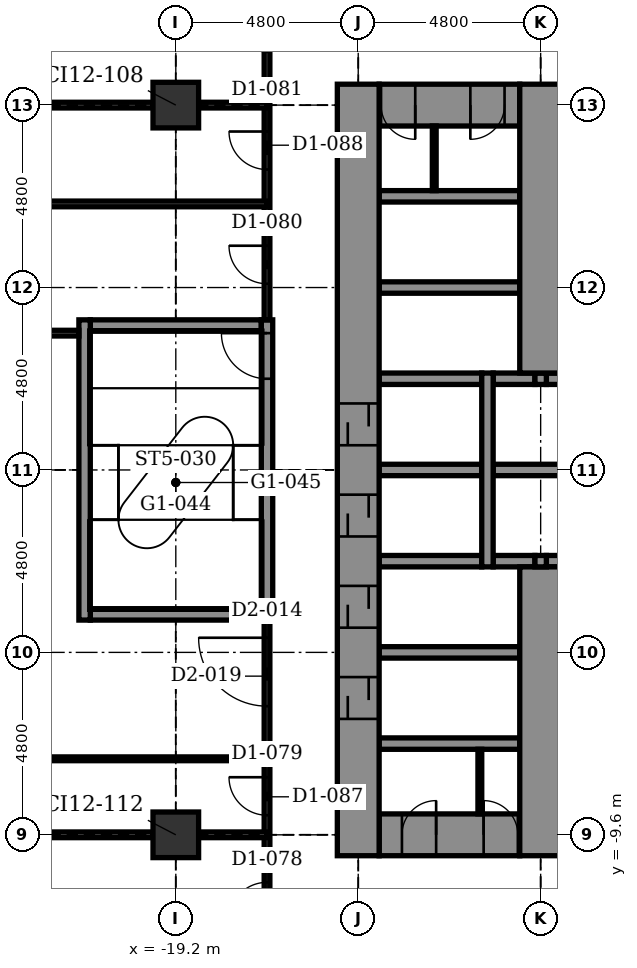
"""IFC4 building model, lengths in metres.
Left out: names, types, materials, properties, quantities, classifications, styles, units other than length and angle.
Written with IfcOpenShell. Run it as: python <this file> out.ifc"""

import sys

from ifc_helpers import new_model, si_unit, direction, frame, frame_2d, origin, origin_2d, place, context, subcontext, project, spatial, rectangle, extrude, element, fill, save


model = new_model("IFC4")
c1 = context("Model", 3, precision=1e-05, world=origin(), true_north=direction((0.0, 1.0)))
c2 = subcontext(c1, "Body", "Model", "MODEL_VIEW")
j1 = project(units=[si_unit("LENGTHUNIT", "METRE"), si_unit("PLANEANGLEUNIT", "RADIAN")], contexts=[c1])
p1 = place(None, origin())
s1 = spatial("IfcSite", under=j1, at=p1, CompositionType="ELEMENT")
p2 = place(p1, origin())
s2 = spatial("IfcBuilding", under=s1, at=p2, CompositionType="ELEMENT")
p3 = place(p2, frame((0.0, 0.0, 22.4)))
s3 = spatial("IfcBuildingStorey", under=s2, at=p3, CompositionType="ELEMENT", Elevation=22.4)
for number, where, z_axis, x_axis in (
    (1, (-19.2, -9.6, -0.25), (0.0, 0.0, 1.0), (1.0, 0.0, 0.0)),
    (2, (-19.2, 9.6, -0.25), (0.0, 0.0, 1.0), (1.0, 0.0, 0.0)),
):
    element("IfcColumn", number, at=place(p3, frame(where, z_axis=z_axis, x_axis=x_axis)), inside=s3, PredefinedType="COLUMN", context=c2, shape_type="SweptSolid", body=[
        extrude(rectangle(XDim=1.2, YDim=1.2, at=origin_2d()), origin(), (0.0, 0.0, 1.0), 5.5),
    ])
p4 = place(p3, frame((-13.85, -9.6, -0.25), z_axis=(0.0, 0.0, 1.0), x_axis=(1.0, 0.0, 0.0)))
e3 = element("IfcWall", 3, at=p4, inside=s3, PredefinedType="SHEAR", context=c2, shape_type="SweptSolid", body=[
    extrude(rectangle(XDim=3.7, YDim=1.1, at=frame_2d((1.85, 0.0))), origin(), (0.0, 0.0, 1.0), 5.5),
])
p5 = place(p4, frame((0.6, 0.0, 0.25)))
e4 = element("IfcOpeningElement", 4, at=p5, cuts=e3, PredefinedType="OPENING", context=c2, shape_type="SweptSolid", body=[
    extrude(rectangle(XDim=0.9, YDim=2.1, at=frame_2d((0.45, 1.05))), frame((0.0, 0.56, 0.0), z_axis=(0.0, -1.0, 0.0), x_axis=(1.0, 0.0, 0.0)), (0.0, 0.0, 1.0), 1.12),
])
p6 = place(p4, frame((2.75, 0.0, 0.25)))
e5 = element("IfcOpeningElement", 5, at=p6, cuts=e3, PredefinedType="OPENING", context=c2, shape_type="SweptSolid", body=[
    extrude(rectangle(XDim=0.9, YDim=2.1, at=frame_2d((0.45, 1.05))), frame((0.0, 0.56, 0.0), z_axis=(0.0, -1.0, 0.0), x_axis=(1.0, 0.0, 0.0)), (0.0, 0.0, 1.0), 1.12),
])
for number, where, z_axis, x_axis in (
    (6, (-13.85, -7.2, -0.25), (0.0, 0.0, 1.0), (1.0, 0.0, 0.0)),
    (7, (-13.85, -4.8, -0.25), (0.0, 0.0, 1.0), (1.0, 0.0, 0.0)),
):
    element("IfcWall", number, at=place(p3, frame(where, z_axis=z_axis, x_axis=x_axis)), inside=s3, PredefinedType="STANDARD", context=c2, shape_type="SweptSolid", body=[
        extrude(rectangle(XDim=3.7, YDim=0.3, at=frame_2d((1.85, 0.0))), origin(), (0.0, 0.0, 1.0), 5.5),
    ])
p7 = place(p3, frame((-21.45, -3.8, -0.25), z_axis=(0.0, 0.0, 1.0), x_axis=(1.0, 0.0, 0.0)))
e8 = element("IfcWall", 8, at=p7, inside=s3, PredefinedType="STANDARD", context=c2, shape_type="SweptSolid", body=[
    extrude(rectangle(XDim=4.5, YDim=0.3, at=frame_2d((2.25, 0.0))), origin(), (0.0, 0.0, 1.0), 5.5),
])
p8 = place(p3, frame((-13.85, -2.4, -0.25), z_axis=(0.0, 0.0, 1.0), x_axis=(1.0, 0.0, 0.0)))
e9 = element("IfcWall", 9, at=p8, inside=s3, PredefinedType="STANDARD", context=c2, shape_type="SweptSolid", body=[
    extrude(rectangle(XDim=2.7, YDim=0.3, at=frame_2d((1.35, 0.0))), origin(), (0.0, 0.0, 1.0), 5.5),
])
p9 = place(p3, frame((-10.85, -2.4, -0.25), z_axis=(0.0, 0.0, 1.0), x_axis=(1.0, 0.0, 0.0)))
e10 = element("IfcWall", 10, at=p9, inside=s3, PredefinedType="STANDARD", context=c2, shape_type="SweptSolid", body=[
    extrude(rectangle(XDim=1.1, YDim=0.3, at=frame_2d((0.55, 0.0))), origin(), (0.0, 0.0, 1.0), 5.5),
])
p10 = place(p3, frame((-9.45, -2.4, -0.25), z_axis=(0.0, 0.0, 1.0), x_axis=(1.0, 0.0, 0.0)))
e11 = element("IfcWall", 11, at=p10, inside=s3, PredefinedType="STANDARD", context=c2, shape_type="SweptSolid", body=[
    extrude(rectangle(XDim=1.9, YDim=0.3, at=frame_2d((0.95, 0.0))), origin(), (0.0, 0.0, 1.0), 5.5),
])
p11 = place(p3, frame((-13.85, 0.0, -0.25), z_axis=(0.0, 0.0, 1.0), x_axis=(1.0, 0.0, 0.0)))
e12 = element("IfcWall", 12, at=p11, inside=s3, PredefinedType="STANDARD", context=c2, shape_type="SweptSolid", body=[
    extrude(rectangle(XDim=2.7, YDim=0.3, at=frame_2d((1.35, 0.0))), origin(), (0.0, 0.0, 1.0), 5.5),
])
p12 = place(p3, frame((-10.85, 0.0, -0.25), z_axis=(0.0, 0.0, 1.0), x_axis=(1.0, 0.0, 0.0)))
e13 = element("IfcWall", 13, at=p12, inside=s3, PredefinedType="STANDARD", context=c2, shape_type="SweptSolid", body=[
    extrude(rectangle(XDim=3.3, YDim=0.3, at=frame_2d((1.65, 0.0))), origin(), (0.0, 0.0, 1.0), 5.5),
])
p13 = place(p3, frame((-13.85, 2.4, -0.25), z_axis=(0.0, 0.0, 1.0), x_axis=(1.0, 0.0, 0.0)))
e14 = element("IfcWall", 14, at=p13, inside=s3, PredefinedType="STANDARD", context=c2, shape_type="SweptSolid", body=[
    extrude(rectangle(XDim=2.7, YDim=0.3, at=frame_2d((1.35, 0.0))), origin(), (0.0, 0.0, 1.0), 5.5),
])
p14 = place(p3, frame((-10.85, 2.4, -0.25), z_axis=(0.0, 0.0, 1.0), x_axis=(1.0, 0.0, 0.0)))
e15 = element("IfcWall", 15, at=p14, inside=s3, PredefinedType="STANDARD", context=c2, shape_type="SweptSolid", body=[
    extrude(rectangle(XDim=1.1, YDim=0.3, at=frame_2d((0.55, 0.0))), origin(), (0.0, 0.0, 1.0), 5.5),
])
p15 = place(p3, frame((-9.45, 2.4, -0.25), z_axis=(0.0, 0.0, 1.0), x_axis=(1.0, 0.0, 0.0)))
e16 = element("IfcWall", 16, at=p15, inside=s3, PredefinedType="STANDARD", context=c2, shape_type="SweptSolid", body=[
    extrude(rectangle(XDim=1.9, YDim=0.3, at=frame_2d((0.95, 0.0))), origin(), (0.0, 0.0, 1.0), 5.5),
])
p16 = place(p3, frame((-21.45, 3.8, -0.25), z_axis=(0.0, 0.0, 1.0), x_axis=(1.0, 0.0, 0.0)))
e17 = element("IfcWall", 17, at=p16, inside=s3, PredefinedType="STANDARD", context=c2, shape_type="SweptSolid", body=[
    extrude(rectangle(XDim=4.5, YDim=0.3, at=frame_2d((2.25, 0.0))), origin(), (0.0, 0.0, 1.0), 5.5),
])
for number, where, z_axis, x_axis in (
    (18, (-13.85, 4.8, -0.25), (0.0, 0.0, 1.0), (1.0, 0.0, 0.0)),
    (19, (-13.85, 7.2, -0.25), (0.0, 0.0, 1.0), (1.0, 0.0, 0.0)),
):
    element("IfcWall", number, at=place(p3, frame(where, z_axis=z_axis, x_axis=x_axis)), inside=s3, PredefinedType="STANDARD", context=c2, shape_type="SweptSolid", body=[
        extrude(rectangle(XDim=3.7, YDim=0.3, at=frame_2d((1.85, 0.0))), origin(), (0.0, 0.0, 1.0), 5.5),
    ])
p17 = place(p3, frame((-13.85, 9.6, -0.25), z_axis=(0.0, 0.0, 1.0), x_axis=(1.0, 0.0, 0.0)))
e20 = element("IfcWall", 20, at=p17, inside=s3, PredefinedType="SHEAR", context=c2, shape_type="SweptSolid", body=[
    extrude(rectangle(XDim=3.7, YDim=1.1, at=frame_2d((1.85, 0.0))), origin(), (0.0, 0.0, 1.0), 5.5),
])
p18 = place(p17, frame((0.05, 0.0, 0.25)))
e21 = element("IfcOpeningElement", 21, at=p18, cuts=e20, PredefinedType="OPENING", context=c2, shape_type="SweptSolid", body=[
    extrude(rectangle(XDim=0.9, YDim=2.1, at=frame_2d((0.45, 1.05))), frame((0.0, 0.56, 0.0), z_axis=(0.0, -1.0, 0.0), x_axis=(1.0, 0.0, 0.0)), (0.0, 0.0, 1.0), 1.12),
])
p19 = place(p17, frame((2.4, 0.0, 0.25)))
e22 = element("IfcOpeningElement", 22, at=p19, cuts=e20, PredefinedType="OPENING", context=c2, shape_type="SweptSolid", body=[
    extrude(rectangle(XDim=0.9, YDim=2.1, at=frame_2d((0.45, 1.05))), frame((0.0, 0.56, 0.0), z_axis=(0.0, -1.0, 0.0), x_axis=(1.0, 0.0, 0.0)), (0.0, 0.0, 1.0), 1.12),
])
p20 = place(p3, frame((-21.6, -3.95, -0.25), z_axis=(0.0, 0.0, 1.0), x_axis=(0.0, 1.0, 0.0)))
e23 = element("IfcWall", 23, at=p20, inside=s3, PredefinedType="STANDARD", context=c2, shape_type="SweptSolid", body=[
    extrude(rectangle(XDim=7.9, YDim=0.3, at=frame_2d((3.95, 0.0))), origin(), (0.0, 0.0, 1.0), 5.5),
])
p21 = place(p3, frame((-16.8, -3.95, -0.25), z_axis=(0.0, 0.0, 1.0), x_axis=(0.0, 1.0, 0.0)))
e24 = element("IfcWall", 24, at=p21, inside=s3, PredefinedType="STANDARD", context=c2, shape_type="SweptSolid", body=[
    extrude(rectangle(XDim=7.9, YDim=0.3, at=frame_2d((3.95, 0.0))), origin(), (0.0, 0.0, 1.0), 5.5),
])
p22 = place(p21, frame((6.35, 0.0, 0.25)))
e25 = element("IfcOpeningElement", 25, at=p22, cuts=e24, PredefinedType="OPENING", context=c2, shape_type="SweptSolid", body=[
    extrude(rectangle(XDim=1.2, YDim=2.1, at=frame_2d((0.6, 1.05))), frame((0.0, 0.16, 0.0), z_axis=(0.0, -1.0, 0.0), x_axis=(1.0, 0.0, 0.0)), (0.0, 0.0, 1.0), 0.32),
])
p23 = place(p3, frame((-14.4, -10.15, -0.25), z_axis=(0.0, 0.0, 1.0), x_axis=(0.0, 1.0, 0.0)))
e26 = element("IfcWall", 26, at=p23, inside=s3, PredefinedType="SHEAR", context=c2, shape_type="SweptSolid", body=[
    extrude(rectangle(XDim=20.3, YDim=1.1, at=frame_2d((10.15, 0.0))), origin(), (0.0, 0.0, 1.0), 5.5),
])
p24 = place(p23, frame((3.6, 0.0, 0.25)))
e27 = element("IfcOpeningElement", 27, at=p24, cuts=e26, PredefinedType="OPENING", context=c2, shape_type="SweptSolid", body=[
    extrude(rectangle(XDim=1.1, YDim=2.1, at=frame_2d((0.55, 1.05))), frame((0.0, 0.56, 0.0), z_axis=(0.0, -1.0, 0.0), x_axis=(1.0, 0.0, 0.0)), (0.0, 0.0, 1.0), 1.12),
])
p25 = place(p23, frame((6.0, 0.0, 0.25)))
e28 = element("IfcOpeningElement", 28, at=p25, cuts=e26, PredefinedType="OPENING", context=c2, shape_type="SweptSolid", body=[
    extrude(rectangle(XDim=1.1, YDim=2.1, at=frame_2d((0.55, 1.05))), frame((0.0, 0.56, 0.0), z_axis=(0.0, -1.0, 0.0), x_axis=(1.0, 0.0, 0.0)), (0.0, 0.0, 1.0), 1.12),
])
p26 = place(p23, frame((8.4, 0.0, 0.25)))
e29 = element("IfcOpeningElement", 29, at=p26, cuts=e26, PredefinedType="OPENING", context=c2, shape_type="SweptSolid", body=[
    extrude(rectangle(XDim=1.1, YDim=2.1, at=frame_2d((0.55, 1.05))), frame((0.0, 0.56, 0.0), z_axis=(0.0, -1.0, 0.0), x_axis=(1.0, 0.0, 0.0)), (0.0, 0.0, 1.0), 1.12),
])
p27 = place(p23, frame((10.8, 0.0, 0.25)))
e30 = element("IfcOpeningElement", 30, at=p27, cuts=e26, PredefinedType="OPENING", context=c2, shape_type="SweptSolid", body=[
    extrude(rectangle(XDim=1.1, YDim=2.1, at=frame_2d((0.55, 1.05))), frame((0.0, 0.56, 0.0), z_axis=(0.0, -1.0, 0.0), x_axis=(1.0, 0.0, 0.0)), (0.0, 0.0, 1.0), 1.12),
])
p28 = place(p3, frame((-11.0, -2.55, -0.25), z_axis=(0.0, 0.0, 1.0), x_axis=(0.0, 1.0, 0.0)))
e31 = element("IfcWall", 31, at=p28, inside=s3, PredefinedType="STANDARD", context=c2, shape_type="SweptSolid", body=[
    extrude(rectangle(XDim=5.1, YDim=0.3, at=frame_2d((2.55, 0.0))), origin(), (0.0, 0.0, 1.0), 5.5),
])
p29 = place(p3, frame((-9.6, -10.15, -0.25), z_axis=(0.0, 0.0, 1.0), x_axis=(0.0, 1.0, 0.0)))
e32 = element("IfcWall", 32, at=p29, inside=s3, PredefinedType="SHEAR", context=c2, shape_type="SweptSolid", body=[
    extrude(rectangle(XDim=7.6, YDim=1.1, at=frame_2d((3.8, 0.0))), origin(), (0.0, 0.0, 1.0), 5.5),
])
for number, where, z_axis, x_axis in (
    (33, (-9.6, -2.55, -0.25), (0.0, 0.0, 1.0), (0.0, 1.0, 0.0)),
    (34, (-9.6, 2.25, -0.25), (0.0, 0.0, 1.0), (0.0, 1.0, 0.0)),
):
    element("IfcWall", number, at=place(p3, frame(where, z_axis=z_axis, x_axis=x_axis)), inside=s3, PredefinedType="STANDARD", context=c2, shape_type="SweptSolid", body=[
        extrude(rectangle(XDim=0.3, YDim=0.3, at=frame_2d((0.15, 0.0))), origin(), (0.0, 0.0, 1.0), 5.5),
    ])
p30 = place(p3, frame((-9.6, 2.55, -0.25), z_axis=(0.0, 0.0, 1.0), x_axis=(0.0, 1.0, 0.0)))
e35 = element("IfcWall", 35, at=p30, inside=s3, PredefinedType="SHEAR", context=c2, shape_type="SweptSolid", body=[
    extrude(rectangle(XDim=7.6, YDim=1.1, at=frame_2d((3.8, 0.0))), origin(), (0.0, 0.0, 1.0), 5.5),
])
for number, where, z_axis, x_axis in (
    (36, (-11.2, -9.05, 0.0), (0.0, 0.0, 1.0), (0.0, 1.0, 0.0)),
    (37, (-12.4, 7.35, 0.0), (0.0, 0.0, 1.0), (0.0, 1.0, 0.0)),
):
    element("IfcWall", number, at=place(p3, frame(where, z_axis=z_axis, x_axis=x_axis)), inside=s3, PredefinedType="PARTITIONING", context=c2, shape_type="SweptSolid", body=[
        extrude(rectangle(XDim=1.7, YDim=0.1, at=frame_2d((0.85, 0.0))), origin(), (0.0, 0.0, 1.0), 5.25),
    ])
p31 = place(p3, frame((-16.8, -12.7, 0.0), z_axis=(0.0, 0.0, 1.0), x_axis=(0.0, 1.0, 0.0)))
e38 = element("IfcWall", 38, at=p31, inside=s3, PredefinedType="PARTITIONING", context=c2, shape_type="SweptSolid", body=[
    extrude(rectangle(XDim=8.75, YDim=0.15, at=frame_2d((4.375, 0.0))), origin(), (0.0, 0.0, 1.0), 5.25),
])
p32 = place(p31, frame((0.85, 0.0, 0.0)))
e39 = element("IfcOpeningElement", 39, at=p32, cuts=e38, PredefinedType="OPENING", context=c2, shape_type="SweptSolid", body=[
    extrude(rectangle(XDim=1.0, YDim=2.1, at=frame_2d((0.5, 1.05))), frame((0.0, 0.085, 0.0), z_axis=(0.0, -1.0, 0.0), x_axis=(1.0, 0.0, 0.0)), (0.0, 0.0, 1.0), 0.17),
])
p33 = place(p31, frame((3.615, 0.0, 0.0)))
e40 = element("IfcOpeningElement", 40, at=p33, cuts=e38, PredefinedType="OPENING", context=c2, shape_type="SweptSolid", body=[
    extrude(rectangle(XDim=1.0, YDim=2.1, at=frame_2d((0.5, 1.05))), frame((0.0, 0.085, 0.0), z_axis=(0.0, -1.0, 0.0), x_axis=(1.0, 0.0, 0.0)), (0.0, 0.0, 1.0), 0.17),
])
p34 = place(p31, frame((6.485, 0.0, 0.0)))
e41 = element("IfcOpeningElement", 41, at=p34, cuts=e38, PredefinedType="OPENING", context=c2, shape_type="SweptSolid", body=[
    extrude(rectangle(XDim=1.8, YDim=2.1, at=frame_2d((0.9, 1.05))), frame((0.0, 0.085, 0.0), z_axis=(0.0, -1.0, 0.0), x_axis=(1.0, 0.0, 0.0)), (0.0, 0.0, 1.0), 0.17),
])
p35 = place(p3, frame((-16.8, 3.95, 0.0), z_axis=(0.0, 0.0, 1.0), x_axis=(0.0, 1.0, 0.0)))
e42 = element("IfcWall", 42, at=p35, inside=s3, PredefinedType="PARTITIONING", context=c2, shape_type="SweptSolid", body=[
    extrude(rectangle(XDim=9.05, YDim=0.15, at=frame_2d((4.525, 0.0))), origin(), (0.0, 0.0, 1.0), 5.25),
])
p36 = place(p35, frame((0.95, 0.0, 0.0)))
e43 = element("IfcOpeningElement", 43, at=p36, cuts=e42, PredefinedType="OPENING", context=c2, shape_type="SweptSolid", body=[
    extrude(rectangle(XDim=1.0, YDim=2.1, at=frame_2d((0.5, 1.05))), frame((0.0, 0.085, 0.0), z_axis=(0.0, -1.0, 0.0), x_axis=(1.0, 0.0, 0.0)), (0.0, 0.0, 1.0), 0.17),
])
p37 = place(p35, frame((3.955, 0.0, 0.0)))
e44 = element("IfcOpeningElement", 44, at=p37, cuts=e42, PredefinedType="OPENING", context=c2, shape_type="SweptSolid", body=[
    extrude(rectangle(XDim=1.0, YDim=2.1, at=frame_2d((0.5, 1.05))), frame((0.0, 0.085, 0.0), z_axis=(0.0, -1.0, 0.0), x_axis=(1.0, 0.0, 0.0)), (0.0, 0.0, 1.0), 0.17),
])
p38 = place(p35, frame((7.05, 0.0, 0.0)))
e45 = element("IfcOpeningElement", 45, at=p38, cuts=e42, PredefinedType="OPENING", context=c2, shape_type="SweptSolid", body=[
    extrude(rectangle(XDim=1.0, YDim=2.1, at=frame_2d((0.5, 1.05))), frame((0.0, 0.085, 0.0), z_axis=(0.0, -1.0, 0.0), x_axis=(1.0, 0.0, 0.0)), (0.0, 0.0, 1.0), 0.17),
])
p39 = place(p3, frame((-30.987, -9.6, 0.0), z_axis=(0.0, 0.0, 1.0), x_axis=(1.0, 0.0, 0.0)))
e46 = element("IfcWall", 46, at=p39, inside=s3, PredefinedType="PARTITIONING", context=c2, shape_type="SweptSolid", body=[
    extrude(rectangle(XDim=11.187, YDim=0.15, at=frame_2d((5.593, 0.0))), origin(), (0.0, 0.0, 1.0), 4.488),
])
p40 = place(p3, frame((-18.6, -9.6, 0.0), z_axis=(0.0, 0.0, 1.0), x_axis=(1.0, 0.0, 0.0)))
e47 = element("IfcWall", 47, at=p40, inside=s3, PredefinedType="PARTITIONING", context=c2, shape_type="SweptSolid", body=[
    extrude(rectangle(XDim=1.8, YDim=0.15, at=frame_2d((0.9, 0.0))), origin(), (0.0, 0.0, 1.0), 4.642),
])
p41 = place(p3, frame((-32.142, -7.6, 0.0), z_axis=(0.0, 0.0, 1.0), x_axis=(1.0, 0.0, 0.0)))
e48 = element("IfcWall", 48, at=p41, inside=s3, PredefinedType="PARTITIONING", context=c2, shape_type="SweptSolid", body=[
    extrude(rectangle(XDim=15.342, YDim=0.1, at=frame_2d((7.671, 0.0))), origin(), (0.0, 0.0, 1.0), 5.25),
])
p42 = place(p3, frame((-34.451, 3.6, 0.0), z_axis=(0.0, 0.0, 1.0), x_axis=(1.0, 0.0, 0.0)))
e49 = element("IfcWall", 49, at=p42, inside=s3, PredefinedType="PARTITIONING", context=c2, shape_type="SweptSolid", body=[
    extrude(rectangle(XDim=12.701, YDim=0.15, at=frame_2d((6.351, 0.0))), origin(), (0.0, 0.0, 1.0), 5.25),
])
p43 = place(p3, frame((-32.488, 7.0, 0.0), z_axis=(0.0, 0.0, 1.0), x_axis=(1.0, 0.0, 0.0)))
e50 = element("IfcWall", 50, at=p43, inside=s3, PredefinedType="PARTITIONING", context=c2, shape_type="SweptSolid", body=[
    extrude(rectangle(XDim=15.688, YDim=0.15, at=frame_2d((7.844, 0.0))), origin(), (0.0, 0.0, 1.0), 5.25),
])
p44 = place(p3, frame((-30.987, 9.6, 0.0), z_axis=(0.0, 0.0, 1.0), x_axis=(1.0, 0.0, 0.0)))
e51 = element("IfcWall", 51, at=p44, inside=s3, PredefinedType="PARTITIONING", context=c2, shape_type="SweptSolid", body=[
    extrude(rectangle(XDim=11.187, YDim=0.15, at=frame_2d((5.593, 0.0))), origin(), (0.0, 0.0, 1.0), 4.488),
])
p45 = place(p3, frame((-18.6, 9.6, 0.0), z_axis=(0.0, 0.0, 1.0), x_axis=(1.0, 0.0, 0.0)))
e52 = element("IfcWall", 52, at=p45, inside=s3, PredefinedType="PARTITIONING", context=c2, shape_type="SweptSolid", body=[
    extrude(rectangle(XDim=1.8, YDim=0.15, at=frame_2d((0.9, 0.0))), origin(), (0.0, 0.0, 1.0), 4.642),
])
p46 = place(p32, origin())
e53 = element("IfcDoor", 53, at=p46, inside=s3, OperationType="SINGLE_SWING_LEFT", PredefinedType="DOOR", context=c2, shape_type="SweptSolid", body=[
    extrude(rectangle(XDim=1.0, YDim=2.1, at=frame_2d((0.5, 1.05))), frame((0.0, 0.025, 0.0), z_axis=(0.0, -1.0, 0.0), x_axis=(1.0, 0.0, 0.0)), (0.0, 0.0, 1.0), 0.05),
])
fill(e39, e53)
p47 = place(p33, origin())
e54 = element("IfcDoor", 54, at=p47, inside=s3, OperationType="SINGLE_SWING_RIGHT", PredefinedType="DOOR", context=c2, shape_type="SweptSolid", body=[
    extrude(rectangle(XDim=1.0, YDim=2.1, at=frame_2d((0.5, 1.05))), frame((0.0, 0.025, 0.0), z_axis=(0.0, -1.0, 0.0), x_axis=(1.0, 0.0, 0.0)), (0.0, 0.0, 1.0), 0.05),
])
fill(e40, e54)
p48 = place(p34, origin())
e55 = element("IfcDoor", 55, at=p48, inside=s3, OperationType="SINGLE_SWING_RIGHT", PredefinedType="DOOR", context=c2, shape_type="SweptSolid", body=[
    extrude(rectangle(XDim=1.8, YDim=2.1, at=frame_2d((0.9, 1.05))), frame((0.0, 0.025, 0.0), z_axis=(0.0, -1.0, 0.0), x_axis=(1.0, 0.0, 0.0)), (0.0, 0.0, 1.0), 0.05),
])
fill(e41, e55)
p49 = place(p36, origin())
e56 = element("IfcDoor", 56, at=p49, inside=s3, OperationType="SINGLE_SWING_RIGHT", PredefinedType="DOOR", context=c2, shape_type="SweptSolid", body=[
    extrude(rectangle(XDim=1.0, YDim=2.1, at=frame_2d((0.5, 1.05))), frame((0.0, 0.025, 0.0), z_axis=(0.0, -1.0, 0.0), x_axis=(1.0, 0.0, 0.0)), (0.0, 0.0, 1.0), 0.05),
])
fill(e43, e56)
p50 = place(p37, origin())
e57 = element("IfcDoor", 57, at=p50, inside=s3, OperationType="SINGLE_SWING_RIGHT", PredefinedType="DOOR", context=c2, shape_type="SweptSolid", body=[
    extrude(rectangle(XDim=1.0, YDim=2.1, at=frame_2d((0.5, 1.05))), frame((0.0, 0.025, 0.0), z_axis=(0.0, -1.0, 0.0), x_axis=(1.0, 0.0, 0.0)), (0.0, 0.0, 1.0), 0.05),
])
fill(e44, e57)
p51 = place(p24, origin())
e58 = element("IfcDoor", 58, at=p51, inside=s3, OperationType="DOUBLE_DOOR_SLIDING", PredefinedType="DOOR", context=c2, shape_type="SweptSolid", body=[
    extrude(rectangle(XDim=1.1, YDim=2.1, at=frame_2d((0.55, 1.05))), frame((0.0, 0.025, 0.0), z_axis=(0.0, -1.0, 0.0), x_axis=(1.0, 0.0, 0.0)), (0.0, 0.0, 1.0), 0.05),
])
fill(e27, e58)
p52 = place(p25, origin())
e59 = element("IfcDoor", 59, at=p52, inside=s3, OperationType="DOUBLE_DOOR_SLIDING", PredefinedType="DOOR", context=c2, shape_type="SweptSolid", body=[
    extrude(rectangle(XDim=1.1, YDim=2.1, at=frame_2d((0.55, 1.05))), frame((0.0, 0.025, 0.0), z_axis=(0.0, -1.0, 0.0), x_axis=(1.0, 0.0, 0.0)), (0.0, 0.0, 1.0), 0.05),
])
fill(e28, e59)
p53 = place(p26, origin())
e60 = element("IfcDoor", 60, at=p53, inside=s3, OperationType="DOUBLE_DOOR_SLIDING", PredefinedType="DOOR", context=c2, shape_type="SweptSolid", body=[
    extrude(rectangle(XDim=1.1, YDim=2.1, at=frame_2d((0.55, 1.05))), frame((0.0, 0.025, 0.0), z_axis=(0.0, -1.0, 0.0), x_axis=(1.0, 0.0, 0.0)), (0.0, 0.0, 1.0), 0.05),
])
fill(e29, e60)
p54 = place(p27, origin())
e61 = element("IfcDoor", 61, at=p54, inside=s3, OperationType="DOUBLE_DOOR_SLIDING", PredefinedType="DOOR", context=c2, shape_type="SweptSolid", body=[
    extrude(rectangle(XDim=1.1, YDim=2.1, at=frame_2d((0.55, 1.05))), frame((0.0, 0.025, 0.0), z_axis=(0.0, -1.0, 0.0), x_axis=(1.0, 0.0, 0.0)), (0.0, 0.0, 1.0), 0.05),
])
fill(e30, e61)
p55 = place(p22, origin())
e62 = element("IfcDoor", 62, at=p55, inside=s3, OperationType="SINGLE_SWING_RIGHT", PredefinedType="DOOR", context=c2, shape_type="SweptSolid", body=[
    extrude(rectangle(XDim=1.2, YDim=2.1, at=frame_2d((0.6, 1.05))), frame((0.0, 0.025, 0.0), z_axis=(0.0, -1.0, 0.0), x_axis=(1.0, 0.0, 0.0)), (0.0, 0.0, 1.0), 0.05),
])
fill(e25, e62)
p56 = place(p5, origin())
e63 = element("IfcDoor", 63, at=p56, inside=s3, OperationType="SINGLE_SWING_RIGHT", PredefinedType="DOOR", context=c2, shape_type="SweptSolid", body=[
    extrude(rectangle(XDim=0.9, YDim=2.1, at=frame_2d((0.45, 1.05))), frame((0.0, 0.025, 0.0), z_axis=(0.0, -1.0, 0.0), x_axis=(1.0, 0.0, 0.0)), (0.0, 0.0, 1.0), 0.05),
])
fill(e4, e63)
p57 = place(p6, origin())
e64 = element("IfcDoor", 64, at=p57, inside=s3, OperationType="SINGLE_SWING_LEFT", PredefinedType="DOOR", context=c2, shape_type="SweptSolid", body=[
    extrude(rectangle(XDim=0.9, YDim=2.1, at=frame_2d((0.45, 1.05))), frame((0.0, 0.025, 0.0), z_axis=(0.0, -1.0, 0.0), x_axis=(1.0, 0.0, 0.0)), (0.0, 0.0, 1.0), 0.05),
])
fill(e5, e64)
p58 = place(p18, frame((0.9, 0.0, 0.0), z_axis=(0.0, 0.0, 1.0), x_axis=(-1.0, 0.0, 0.0)))
e65 = element("IfcDoor", 65, at=p58, inside=s3, OperationType="SINGLE_SWING_RIGHT", PredefinedType="DOOR", context=c2, shape_type="SweptSolid", body=[
    extrude(rectangle(XDim=0.9, YDim=2.1, at=frame_2d((0.45, 1.05))), frame((0.0, 0.025, 0.0), z_axis=(0.0, -1.0, 0.0), x_axis=(1.0, 0.0, 0.0)), (0.0, 0.0, 1.0), 0.05),
])
fill(e21, e65)
p59 = place(p19, frame((0.9, 0.0, 0.0), z_axis=(0.0, 0.0, 1.0), x_axis=(-1.0, 0.0, 0.0)))
e66 = element("IfcDoor", 66, at=p59, inside=s3, OperationType="SINGLE_SWING_LEFT", PredefinedType="DOOR", context=c2, shape_type="SweptSolid", body=[
    extrude(rectangle(XDim=0.9, YDim=2.1, at=frame_2d((0.45, 1.05))), frame((0.0, 0.025, 0.0), z_axis=(0.0, -1.0, 0.0), x_axis=(1.0, 0.0, 0.0)), (0.0, 0.0, 1.0), 0.05),
])
fill(e22, e66)
save(model, sys.argv[1])
